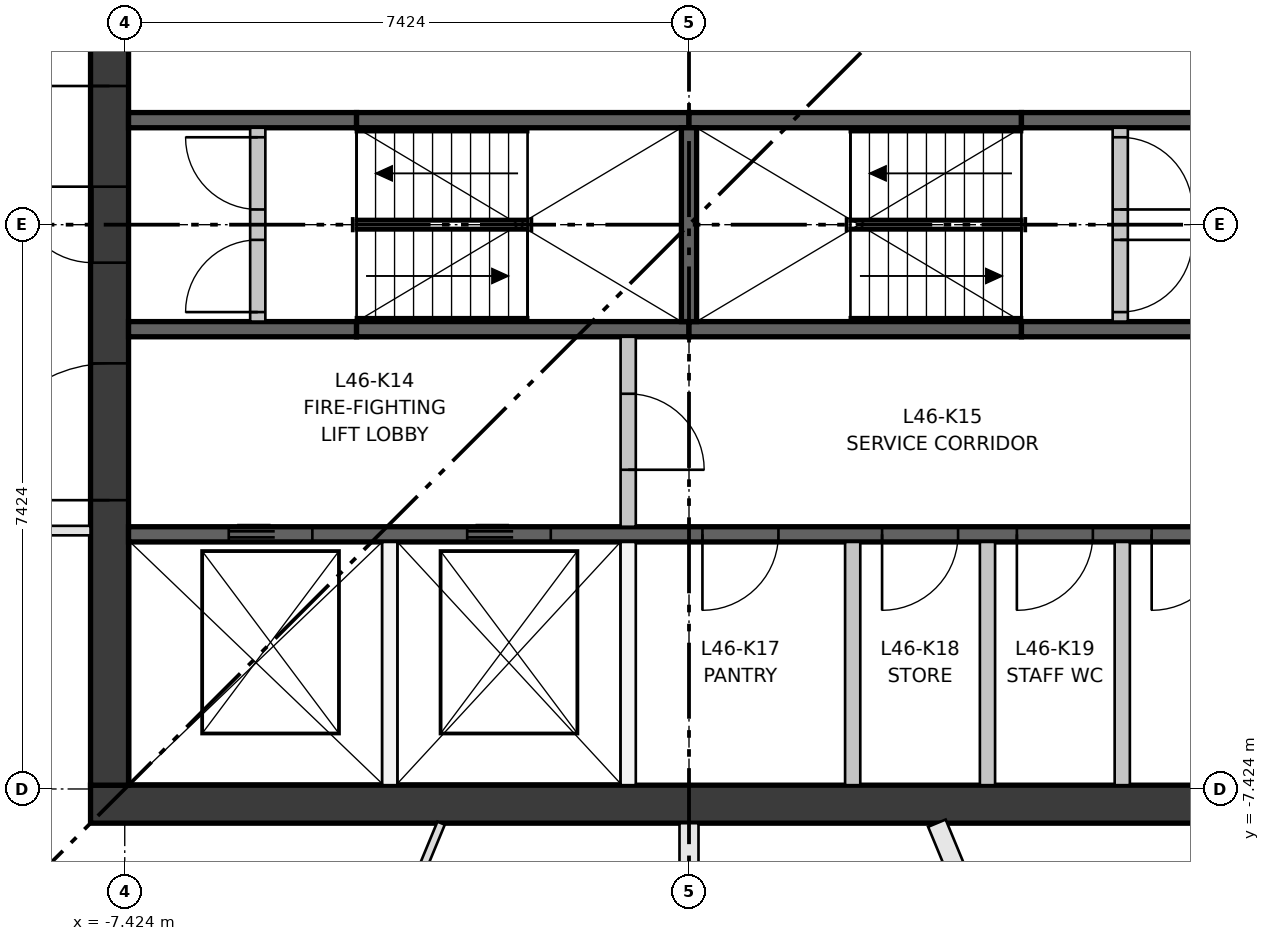
"""IFC4 building model, lengths in metres.
Left out: names, types, materials, properties, quantities, classifications, styles, units other than length and angle.
Written with IfcOpenShell. Run it as: python <this file> out.ifc"""

import sys

from ifc_helpers import new_model, si_unit, direction, frame, frame_2d, origin, place, context, subcontext, project, spatial, rectangle, extrude, element, fill, save


model = new_model("IFC4")
c1 = context("Model", 3, precision=1e-05, world=origin(), true_north=direction((0.0, 1.0)))
c2 = subcontext(c1, "Body", "Model", "MODEL_VIEW")
j1 = project(units=[si_unit("LENGTHUNIT", "METRE"), si_unit("PLANEANGLEUNIT", "RADIAN")], contexts=[c1])
p1 = place(None, origin())
s1 = spatial("IfcSite", under=j1, at=p1, CompositionType="ELEMENT")
p2 = place(p1, origin())
s2 = spatial("IfcBuilding", under=s1, at=p2, CompositionType="ELEMENT")
p3 = place(p2, frame((0.0, 0.0, 174.25)))
s3 = spatial("IfcBuildingStorey", under=s2, at=p3, CompositionType="ELEMENT", Elevation=174.25)
p4 = place(p3, frame((-7.874, -7.624, 0.0), z_axis=(0.0, 0.0, 1.0), x_axis=(1.0, 0.0, 0.0)))
e1 = element("IfcWall", 1, at=p4, inside=s3, PredefinedType="SHEAR", context=c2, shape_type="SweptSolid", body=[
    extrude(rectangle(XDim=15.748, YDim=0.5, at=frame_2d((7.874, 0.0))), origin(), (0.0, 0.0, 1.0), 3.35),
])
p5 = place(p3, frame((-7.624, -7.374, 0.0), z_axis=(0.0, 0.0, 1.0), x_axis=(0.0, 1.0, 0.0)))
e2 = element("IfcWall", 2, at=p5, inside=s3, PredefinedType="SHEAR", context=c2, shape_type="SweptSolid", body=[
    extrude(rectangle(XDim=14.748, YDim=0.5, at=frame_2d((7.374, 0.0))), origin(), (0.0, 0.0, 1.0), 3.35),
])
p6 = place(p5, frame((6.874, 0.0, 0.0)))
e3 = element("IfcOpeningElement", 3, at=p6, cuts=e2, PredefinedType="OPENING", context=c2, shape_type="SweptSolid", body=[
    extrude(rectangle(XDim=1.0, YDim=2.1, at=frame_2d((0.5, 1.05))), frame((0.0, 0.26, 0.0), z_axis=(0.0, -1.0, 0.0), x_axis=(1.0, 0.0, 0.0)), (0.0, 0.0, 1.0), 0.52),
])
p7 = place(p5, frame((3.75, 0.0, 0.0)))
e4 = element("IfcOpeningElement", 4, at=p7, cuts=e2, PredefinedType="OPENING", context=c2, shape_type="SweptSolid", body=[
    extrude(rectangle(XDim=1.8, YDim=2.1, at=frame_2d((0.9, 1.05))), frame((0.0, 0.26, 0.0), z_axis=(0.0, -1.0, 0.0), x_axis=(1.0, 0.0, 0.0)), (0.0, 0.0, 1.0), 0.52),
])
p8 = place(p5, frame((9.198, 0.0, 0.0)))
e5 = element("IfcOpeningElement", 5, at=p8, cuts=e2, PredefinedType="OPENING", context=c2, shape_type="SweptSolid", body=[
    extrude(rectangle(XDim=1.8, YDim=2.1, at=frame_2d((0.9, 1.05))), frame((0.0, 0.26, 0.0), z_axis=(0.0, -1.0, 0.0), x_axis=(1.0, 0.0, 0.0)), (0.0, 0.0, 1.0), 0.52),
])
p9 = place(p3, frame((-7.374, -4.074, 0.0), z_axis=(0.0, 0.0, 1.0), x_axis=(1.0, 0.0, 0.0)))
e6 = element("IfcWall", 6, at=p9, inside=s3, PredefinedType="SHEAR", context=c2, shape_type="SweptSolid", body=[
    extrude(rectangle(XDim=14.748, YDim=0.2, at=frame_2d((7.374, 0.0))), origin(), (0.0, 0.0, 1.0), 3.0),
])
p10 = place(p9, frame((1.319, 0.0, 0.0)))
e7 = element("IfcOpeningElement", 7, at=p10, cuts=e6, PredefinedType="OPENING", context=c2, shape_type="SweptSolid", body=[
    extrude(rectangle(XDim=1.1, YDim=2.1, at=frame_2d((0.55, 1.05))), frame((0.0, 0.11, 0.0), z_axis=(0.0, -1.0, 0.0), x_axis=(1.0, 0.0, 0.0)), (0.0, 0.0, 1.0), 0.22),
])
p11 = place(p9, frame((4.456, 0.0, 0.0)))
e8 = element("IfcOpeningElement", 8, at=p11, cuts=e6, PredefinedType="OPENING", context=c2, shape_type="SweptSolid", body=[
    extrude(rectangle(XDim=1.1, YDim=2.1, at=frame_2d((0.55, 1.05))), frame((0.0, 0.11, 0.0), z_axis=(0.0, -1.0, 0.0), x_axis=(1.0, 0.0, 0.0)), (0.0, 0.0, 1.0), 0.22),
])
p12 = place(p9, frame((7.551, 0.0, 0.0)))
e9 = element("IfcOpeningElement", 9, at=p12, cuts=e6, PredefinedType="OPENING", context=c2, shape_type="SweptSolid", body=[
    extrude(rectangle(XDim=1.0, YDim=2.1, at=frame_2d((0.5, 1.05))), frame((0.0, 0.11, 0.0), z_axis=(0.0, -1.0, 0.0), x_axis=(1.0, 0.0, 0.0)), (0.0, 0.0, 1.0), 0.22),
])
p13 = place(p9, frame((9.914, 0.0, 0.0)))
e10 = element("IfcOpeningElement", 10, at=p13, cuts=e6, PredefinedType="OPENING", context=c2, shape_type="SweptSolid", body=[
    extrude(rectangle(XDim=1.0, YDim=2.1, at=frame_2d((0.5, 1.05))), frame((0.0, 0.11, 0.0), z_axis=(0.0, -1.0, 0.0), x_axis=(1.0, 0.0, 0.0)), (0.0, 0.0, 1.0), 0.22),
])
p14 = place(p9, frame((11.688, 0.0, 0.0)))
e11 = element("IfcOpeningElement", 11, at=p14, cuts=e6, PredefinedType="OPENING", context=c2, shape_type="SweptSolid", body=[
    extrude(rectangle(XDim=1.0, YDim=2.1, at=frame_2d((0.5, 1.05))), frame((0.0, 0.11, 0.0), z_axis=(0.0, -1.0, 0.0), x_axis=(1.0, 0.0, 0.0)), (0.0, 0.0, 1.0), 0.22),
])
p15 = place(p9, frame((13.461, 0.0, 0.0)))
e12 = element("IfcOpeningElement", 12, at=p15, cuts=e6, PredefinedType="OPENING", context=c2, shape_type="SweptSolid", body=[
    extrude(rectangle(XDim=1.0, YDim=2.1, at=frame_2d((0.5, 1.05))), frame((0.0, 0.11, 0.0), z_axis=(0.0, -1.0, 0.0), x_axis=(1.0, 0.0, 0.0)), (0.0, 0.0, 1.0), 0.22),
])
p16 = place(p3, frame((-7.374, -1.375, 0.0), z_axis=(0.0, 0.0, 1.0), x_axis=(1.0, 0.0, 0.0)))
e13 = element("IfcWall", 13, at=p16, inside=s3, PredefinedType="SHEAR", context=c2, shape_type="SweptSolid", body=[
    extrude(rectangle(XDim=3.0, YDim=0.2, at=frame_2d((1.5, 0.0))), origin(), (0.0, 0.0, 1.0), 3.0),
])
for number, where, z_axis, x_axis in (
    (14, (-4.374, -1.375, 0.0), (0.0, 0.0, 1.0), (1.0, 0.0, 0.0)),
    (15, (0.0, -1.375, 0.0), (0.0, 0.0, 1.0), (1.0, 0.0, 0.0)),
):
    element("IfcWall", number, at=place(p3, frame(where, z_axis=z_axis, x_axis=x_axis)), inside=s3, PredefinedType="SHEAR", context=c2, shape_type="SweptSolid", body=[
        extrude(rectangle(XDim=4.374, YDim=0.2, at=frame_2d((2.187, 0.0))), origin(), (0.0, 0.0, 1.0), 3.0),
    ])
for number, where, z_axis, x_axis in (
    (16, (4.374, -1.375, 0.0), (0.0, 0.0, 1.0), (1.0, 0.0, 0.0)),
    (17, (-7.374, 1.375, 0.0), (0.0, 0.0, 1.0), (1.0, 0.0, 0.0)),
):
    element("IfcWall", number, at=place(p3, frame(where, z_axis=z_axis, x_axis=x_axis)), inside=s3, PredefinedType="SHEAR", context=c2, shape_type="SweptSolid", body=[
        extrude(rectangle(XDim=3.0, YDim=0.2, at=frame_2d((1.5, 0.0))), origin(), (0.0, 0.0, 1.0), 3.0),
    ])
for number, where, z_axis, x_axis in (
    (18, (-4.374, 1.375, 0.0), (0.0, 0.0, 1.0), (1.0, 0.0, 0.0)),
    (19, (0.0, 1.375, 0.0), (0.0, 0.0, 1.0), (1.0, 0.0, 0.0)),
):
    element("IfcWall", number, at=place(p3, frame(where, z_axis=z_axis, x_axis=x_axis)), inside=s3, PredefinedType="SHEAR", context=c2, shape_type="SweptSolid", body=[
        extrude(rectangle(XDim=4.374, YDim=0.2, at=frame_2d((2.187, 0.0))), origin(), (0.0, 0.0, 1.0), 3.0),
    ])
p17 = place(p3, frame((4.374, 1.375, 0.0), z_axis=(0.0, 0.0, 1.0), x_axis=(1.0, 0.0, 0.0)))
e20 = element("IfcWall", 20, at=p17, inside=s3, PredefinedType="SHEAR", context=c2, shape_type="SweptSolid", body=[
    extrude(rectangle(XDim=3.0, YDim=0.2, at=frame_2d((1.5, 0.0))), origin(), (0.0, 0.0, 1.0), 3.0),
])
p18 = place(p3, frame((0.0, -1.275, 0.0), z_axis=(0.0, 0.0, 1.0), x_axis=(0.0, 1.0, 0.0)))
e21 = element("IfcWall", 21, at=p18, inside=s3, PredefinedType="SHEAR", context=c2, shape_type="SweptSolid", body=[
    extrude(rectangle(XDim=2.55, YDim=0.2, at=frame_2d((1.275, 0.0))), origin(), (0.0, 0.0, 1.0), 3.0),
])
for number, where, z_axis, x_axis in (
    (22, (-3.937, -7.374, 0.0), (0.0, 0.0, 1.0), (0.0, 1.0, 0.0)),
    (23, (-0.8, -7.374, 0.0), (0.0, 0.0, 1.0), (0.0, 1.0, 0.0)),
):
    element("IfcWall", number, at=place(p3, frame(where, z_axis=z_axis, x_axis=x_axis)), inside=s3, PredefinedType="PARTITIONING", context=c2, shape_type="SweptSolid", body=[
        extrude(rectangle(XDim=3.2, YDim=0.2, at=frame_2d((1.6, 0.0))), origin(), (0.0, 0.0, 1.0), 3.0),
    ])
p19 = place(p3, frame((-0.8, -3.974, 0.0), z_axis=(0.0, 0.0, 1.0), x_axis=(0.0, 1.0, 0.0)))
e24 = element("IfcWall", 24, at=p19, inside=s3, PredefinedType="PARTITIONING", context=c2, shape_type="SweptSolid", body=[
    extrude(rectangle(XDim=2.499, YDim=0.2, at=frame_2d((1.25, 0.0))), origin(), (0.0, 0.0, 1.0), 3.0),
])
p20 = place(p19, frame((0.75, 0.0, 0.0)))
e25 = element("IfcOpeningElement", 25, at=p20, cuts=e24, PredefinedType="OPENING", context=c2, shape_type="SweptSolid", body=[
    extrude(rectangle(XDim=1.0, YDim=2.1, at=frame_2d((0.5, 1.05))), frame((0.0, 0.11, 0.0), z_axis=(0.0, -1.0, 0.0), x_axis=(1.0, 0.0, 0.0)), (0.0, 0.0, 1.0), 0.22),
])
for number, where, z_axis, x_axis in (
    (26, (2.154, -7.374, 0.0), (0.0, 0.0, 1.0), (0.0, 1.0, 0.0)),
    (27, (3.927, -7.374, 0.0), (0.0, 0.0, 1.0), (0.0, 1.0, 0.0)),
    (28, (5.7, -7.374, 0.0), (0.0, 0.0, 1.0), (0.0, 1.0, 0.0)),
):
    element("IfcWall", number, at=place(p3, frame(where, z_axis=z_axis, x_axis=x_axis)), inside=s3, PredefinedType="PARTITIONING", context=c2, shape_type="SweptSolid", body=[
        extrude(rectangle(XDim=3.2, YDim=0.2, at=frame_2d((1.6, 0.0))), origin(), (0.0, 0.0, 1.0), 3.0),
    ])
p21 = place(p3, frame((-5.674, -1.275, 0.0), z_axis=(0.0, 0.0, 1.0), x_axis=(0.0, 1.0, 0.0)))
e29 = element("IfcWall", 29, at=p21, inside=s3, PredefinedType="PARTITIONING", context=c2, shape_type="SweptSolid", body=[
    extrude(rectangle(XDim=2.55, YDim=0.2, at=frame_2d((1.275, 0.0))), origin(), (0.0, 0.0, 1.0), 3.0),
])
p22 = place(p21, frame((0.125, 0.0, 0.0)))
e30 = element("IfcOpeningElement", 30, at=p22, cuts=e29, PredefinedType="OPENING", context=c2, shape_type="SweptSolid", body=[
    extrude(rectangle(XDim=0.95, YDim=2.1, at=frame_2d((0.475, 1.05))), frame((0.0, 0.11, 0.0), z_axis=(0.0, -1.0, 0.0), x_axis=(1.0, 0.0, 0.0)), (0.0, 0.0, 1.0), 0.22),
])
p23 = place(p21, frame((1.475, 0.0, 0.0)))
e31 = element("IfcOpeningElement", 31, at=p23, cuts=e29, PredefinedType="OPENING", context=c2, shape_type="SweptSolid", body=[
    extrude(rectangle(XDim=0.95, YDim=2.1, at=frame_2d((0.475, 1.05))), frame((0.0, 0.11, 0.0), z_axis=(0.0, -1.0, 0.0), x_axis=(1.0, 0.0, 0.0)), (0.0, 0.0, 1.0), 0.22),
])
p24 = place(p3, frame((5.674, -1.275, 0.0), z_axis=(0.0, 0.0, 1.0), x_axis=(0.0, 1.0, 0.0)))
e32 = element("IfcWall", 32, at=p24, inside=s3, PredefinedType="PARTITIONING", context=c2, shape_type="SweptSolid", body=[
    extrude(rectangle(XDim=2.55, YDim=0.2, at=frame_2d((1.275, 0.0))), origin(), (0.0, 0.0, 1.0), 3.0),
])
p25 = place(p24, frame((0.125, 0.0, 0.0)))
e33 = element("IfcOpeningElement", 33, at=p25, cuts=e32, PredefinedType="OPENING", context=c2, shape_type="SweptSolid", body=[
    extrude(rectangle(XDim=0.95, YDim=2.1, at=frame_2d((0.475, 1.05))), frame((0.0, 0.11, 0.0), z_axis=(0.0, -1.0, 0.0), x_axis=(1.0, 0.0, 0.0)), (0.0, 0.0, 1.0), 0.22),
])
p26 = place(p24, frame((1.475, 0.0, 0.0)))
e34 = element("IfcOpeningElement", 34, at=p26, cuts=e32, PredefinedType="OPENING", context=c2, shape_type="SweptSolid", body=[
    extrude(rectangle(XDim=0.95, YDim=2.1, at=frame_2d((0.475, 1.05))), frame((0.0, 0.11, 0.0), z_axis=(0.0, -1.0, 0.0), x_axis=(1.0, 0.0, 0.0)), (0.0, 0.0, 1.0), 0.22),
])
p27 = place(p3, frame((-7.874, -4.024, 0.0), z_axis=(0.0, 0.0, 1.0), x_axis=(-1.0, 0.0, 0.0)))
e35 = element("IfcWall", 35, at=p27, inside=s3, PredefinedType="PARTITIONING", context=c2, shape_type="SweptSolid", body=[
    extrude(rectangle(XDim=4.53, YDim=0.125, at=frame_2d((2.265, 0.0))), origin(), (0.0, 0.0, 1.0), 3.0),
])
p28 = place(p27, frame((1.0, 0.0, 0.0)))
e36 = element("IfcOpeningElement", 36, at=p28, cuts=e35, PredefinedType="OPENING", context=c2, shape_type="SweptSolid", body=[
    extrude(rectangle(XDim=1.8, YDim=2.1, at=frame_2d((0.9, 1.05))), frame((0.0, 0.073, 0.0), z_axis=(0.0, -1.0, 0.0), x_axis=(1.0, 0.0, 0.0)), (0.0, 0.0, 1.0), 0.145),
])
p29 = place(p3, frame((-3.261, -7.874, 0.0), z_axis=(0.0, 0.0, 1.0), x_axis=(-0.382707643949, -0.923869503373, 0.0)))
e37 = element("IfcWall", 37, at=p29, inside=s3, PredefinedType="PARTITIONING", context=c2, shape_type="SweptSolid", body=[
    extrude(rectangle(XDim=4.827, YDim=0.105, at=frame_2d((2.414, 0.0))), origin(), (0.0, 0.0, 1.0), 3.0),
])
p30 = place(p29, frame((1.9, 0.0, 0.0)))
e38 = element("IfcOpeningElement", 38, at=p30, cuts=e37, PredefinedType="OPENING", context=c2, shape_type="SweptSolid", body=[
    extrude(rectangle(XDim=1.0, YDim=2.1, at=frame_2d((0.5, 1.05))), frame((0.0, 0.062, 0.0), z_axis=(0.0, -1.0, 0.0), x_axis=(1.0, 0.0, 0.0)), (0.0, 0.0, 1.0), 0.125),
])
p31 = place(p3, frame((0.0, -7.874, 0.0), z_axis=(0.0, 0.0, 1.0), x_axis=(0.0, -1.0, 0.0)))
e39 = element("IfcWall", 39, at=p31, inside=s3, PredefinedType="PARTITIONING", context=c2, shape_type="SweptSolid", body=[
    extrude(rectangle(XDim=5.476, YDim=0.25, at=frame_2d((2.738, 0.0))), origin(), (0.0, 0.0, 1.0), 3.0),
])
p32 = place(p3, frame((3.261, -7.874, 0.0), z_axis=(0.0, 0.0, 1.0), x_axis=(0.382707643949, -0.923869503373, 0.0)))
e40 = element("IfcWall", 40, at=p32, inside=s3, PredefinedType="PARTITIONING", context=c2, shape_type="SweptSolid", body=[
    extrude(rectangle(XDim=4.827, YDim=0.25, at=frame_2d((2.414, 0.0))), origin(), (0.0, 0.0, 1.0), 3.0),
])
p33 = place(p10, origin())
e41 = element("IfcDoor", 41, at=p33, inside=s3, OperationType="DOUBLE_DOOR_SLIDING", PredefinedType="DOOR", context=c2, shape_type="SweptSolid", body=[
    extrude(rectangle(XDim=1.1, YDim=2.1, at=frame_2d((0.55, 1.05))), frame((0.0, 0.025, 0.0), z_axis=(0.0, -1.0, 0.0), x_axis=(1.0, 0.0, 0.0)), (0.0, 0.0, 1.0), 0.05),
])
fill(e7, e41)
p34 = place(p11, origin())
e42 = element("IfcDoor", 42, at=p34, inside=s3, OperationType="DOUBLE_DOOR_SLIDING", PredefinedType="DOOR", context=c2, shape_type="SweptSolid", body=[
    extrude(rectangle(XDim=1.1, YDim=2.1, at=frame_2d((0.55, 1.05))), frame((0.0, 0.025, 0.0), z_axis=(0.0, -1.0, 0.0), x_axis=(1.0, 0.0, 0.0)), (0.0, 0.0, 1.0), 0.05),
])
fill(e8, e42)
p35 = place(p22, origin())
e43 = element("IfcDoor", 43, at=p35, inside=s3, OperationType="SINGLE_SWING_LEFT", PredefinedType="DOOR", context=c2, shape_type="SweptSolid", body=[
    extrude(rectangle(XDim=0.95, YDim=2.1, at=frame_2d((0.475, 1.05))), frame((0.0, 0.025, 0.0), z_axis=(0.0, -1.0, 0.0), x_axis=(1.0, 0.0, 0.0)), (0.0, 0.0, 1.0), 0.05),
])
fill(e30, e43)
p36 = place(p23, origin())
e44 = element("IfcDoor", 44, at=p36, inside=s3, OperationType="SINGLE_SWING_RIGHT", PredefinedType="DOOR", context=c2, shape_type="SweptSolid", body=[
    extrude(rectangle(XDim=0.95, YDim=2.1, at=frame_2d((0.475, 1.05))), frame((0.0, 0.025, 0.0), z_axis=(0.0, -1.0, 0.0), x_axis=(1.0, 0.0, 0.0)), (0.0, 0.0, 1.0), 0.05),
])
fill(e31, e44)
p37 = place(p25, frame((0.95, 0.0, 0.0), z_axis=(0.0, 0.0, 1.0), x_axis=(-1.0, 0.0, 0.0)))
e45 = element("IfcDoor", 45, at=p37, inside=s3, OperationType="SINGLE_SWING_RIGHT", PredefinedType="DOOR", context=c2, shape_type="SweptSolid", body=[
    extrude(rectangle(XDim=0.95, YDim=2.1, at=frame_2d((0.475, 1.05))), frame((0.0, 0.025, 0.0), z_axis=(0.0, -1.0, 0.0), x_axis=(1.0, 0.0, 0.0)), (0.0, 0.0, 1.0), 0.05),
])
fill(e33, e45)
p38 = place(p26, frame((0.95, 0.0, 0.0), z_axis=(0.0, 0.0, 1.0), x_axis=(-1.0, 0.0, 0.0)))
e46 = element("IfcDoor", 46, at=p38, inside=s3, OperationType="SINGLE_SWING_LEFT", PredefinedType="DOOR", context=c2, shape_type="SweptSolid", body=[
    extrude(rectangle(XDim=0.95, YDim=2.1, at=frame_2d((0.475, 1.05))), frame((0.0, 0.025, 0.0), z_axis=(0.0, -1.0, 0.0), x_axis=(1.0, 0.0, 0.0)), (0.0, 0.0, 1.0), 0.05),
])
fill(e34, e46)
p39 = place(p20, frame((1.0, 0.0, 0.0), z_axis=(0.0, 0.0, 1.0), x_axis=(-1.0, 0.0, 0.0)))
e47 = element("IfcDoor", 47, at=p39, inside=s3, OperationType="SINGLE_SWING_LEFT", PredefinedType="DOOR", context=c2, shape_type="SweptSolid", body=[
    extrude(rectangle(XDim=1.0, YDim=2.1, at=frame_2d((0.5, 1.05))), frame((0.0, 0.025, 0.0), z_axis=(0.0, -1.0, 0.0), x_axis=(1.0, 0.0, 0.0)), (0.0, 0.0, 1.0), 0.05),
])
fill(e25, e47)
p40 = place(p12, frame((1.0, 0.0, 0.0), z_axis=(0.0, 0.0, 1.0), x_axis=(-1.0, 0.0, 0.0)))
e48 = element("IfcDoor", 48, at=p40, inside=s3, OperationType="SINGLE_SWING_LEFT", PredefinedType="DOOR", context=c2, shape_type="SweptSolid", body=[
    extrude(rectangle(XDim=1.0, YDim=2.1, at=frame_2d((0.5, 1.05))), frame((0.0, 0.025, 0.0), z_axis=(0.0, -1.0, 0.0), x_axis=(1.0, 0.0, 0.0)), (0.0, 0.0, 1.0), 0.05),
])
fill(e9, e48)
p41 = place(p13, frame((1.0, 0.0, 0.0), z_axis=(0.0, 0.0, 1.0), x_axis=(-1.0, 0.0, 0.0)))
e49 = element("IfcDoor", 49, at=p41, inside=s3, OperationType="SINGLE_SWING_LEFT", PredefinedType="DOOR", context=c2, shape_type="SweptSolid", body=[
    extrude(rectangle(XDim=1.0, YDim=2.1, at=frame_2d((0.5, 1.05))), frame((0.0, 0.025, 0.0), z_axis=(0.0, -1.0, 0.0), x_axis=(1.0, 0.0, 0.0)), (0.0, 0.0, 1.0), 0.05),
])
fill(e10, e49)
p42 = place(p14, frame((1.0, 0.0, 0.0), z_axis=(0.0, 0.0, 1.0), x_axis=(-1.0, 0.0, 0.0)))
e50 = element("IfcDoor", 50, at=p42, inside=s3, OperationType="SINGLE_SWING_LEFT", PredefinedType="DOOR", context=c2, shape_type="SweptSolid", body=[
    extrude(rectangle(XDim=1.0, YDim=2.1, at=frame_2d((0.5, 1.05))), frame((0.0, 0.025, 0.0), z_axis=(0.0, -1.0, 0.0), x_axis=(1.0, 0.0, 0.0)), (0.0, 0.0, 1.0), 0.05),
])
fill(e11, e50)
p43 = place(p15, frame((1.0, 0.0, 0.0), z_axis=(0.0, 0.0, 1.0), x_axis=(-1.0, 0.0, 0.0)))
e51 = element("IfcDoor", 51, at=p43, inside=s3, OperationType="SINGLE_SWING_LEFT", PredefinedType="DOOR", context=c2, shape_type="SweptSolid", body=[
    extrude(rectangle(XDim=1.0, YDim=2.1, at=frame_2d((0.5, 1.05))), frame((0.0, 0.025, 0.0), z_axis=(0.0, -1.0, 0.0), x_axis=(1.0, 0.0, 0.0)), (0.0, 0.0, 1.0), 0.05),
])
fill(e12, e51)
p44 = place(p6, origin())
e52 = element("IfcDoor", 52, at=p44, inside=s3, OperationType="SINGLE_SWING_RIGHT", PredefinedType="DOOR", context=c2, shape_type="SweptSolid", body=[
    extrude(rectangle(XDim=1.0, YDim=2.1, at=frame_2d((0.5, 1.05))), frame((0.0, 0.25, 0.0), z_axis=(0.0, -1.0, 0.0), x_axis=(1.0, 0.0, 0.0)), (0.0, 0.0, 1.0), 0.05),
])
fill(e3, e52)
p45 = place(p7, origin())
e53 = element("IfcDoor", 53, at=p45, inside=s3, OperationType="DOUBLE_DOOR_SINGLE_SWING", PredefinedType="DOOR", context=c2, shape_type="SweptSolid", body=[
    extrude(rectangle(XDim=1.8, YDim=2.1, at=frame_2d((0.9, 1.05))), frame((0.0, 0.025, 0.0), z_axis=(0.0, -1.0, 0.0), x_axis=(1.0, 0.0, 0.0)), (0.0, 0.0, 1.0), 0.05),
])
fill(e4, e53)
p46 = place(p8, origin())
e54 = element("IfcDoor", 54, at=p46, inside=s3, OperationType="DOUBLE_DOOR_SINGLE_SWING", PredefinedType="DOOR", context=c2, shape_type="SweptSolid", body=[
    extrude(rectangle(XDim=1.8, YDim=2.1, at=frame_2d((0.9, 1.05))), frame((0.0, 0.025, 0.0), z_axis=(0.0, -1.0, 0.0), x_axis=(1.0, 0.0, 0.0)), (0.0, 0.0, 1.0), 0.05),
])
fill(e5, e54)
save(model, sys.argv[1])
